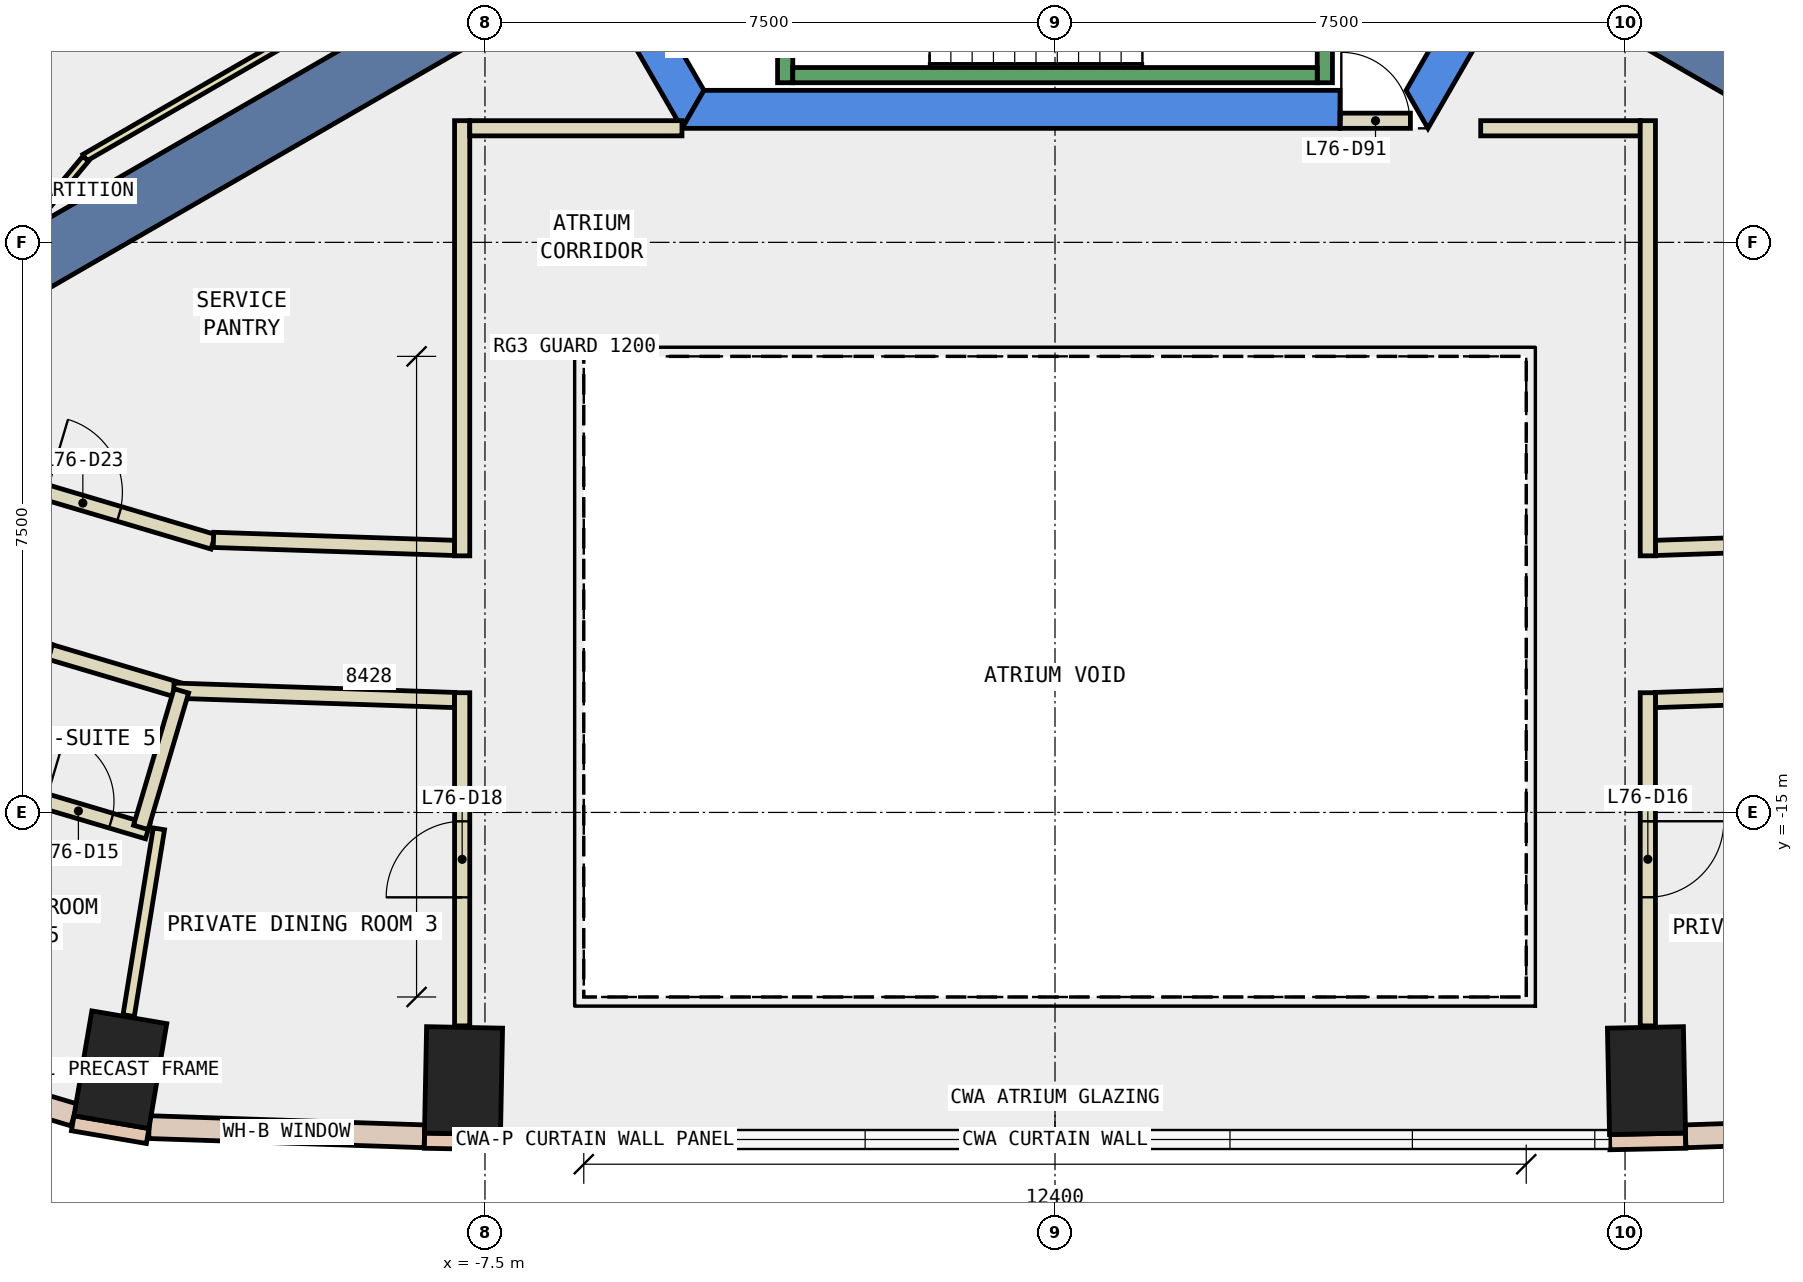
"""IFC4 building model, lengths in metres.
Left out: names, types, materials, properties, quantities, classifications, styles, units other than length and angle.
Written with IfcOpenShell. Run it as: python <this file> out.ifc"""

import sys

from ifc_helpers import new_model, si_unit, direction, frame, frame_2d, origin, origin_2d, place, context, subcontext, project, spatial, polyline, rectangle, outline, extrude, element, fill, save


model = new_model("IFC4")
c1 = context("Model", 3, precision=1e-05, world=origin(), true_north=direction((0.0, 1.0)))
c2 = subcontext(c1, "Body", "Model", "MODEL_VIEW")
j1 = project(units=[si_unit("LENGTHUNIT", "METRE"), si_unit("PLANEANGLEUNIT", "RADIAN")], contexts=[c1])
p1 = place(None, origin())
s1 = spatial("IfcSite", under=j1, at=p1, CompositionType="ELEMENT")
p2 = place(p1, origin())
s2 = spatial("IfcBuilding", under=s1, at=p2, CompositionType="ELEMENT")
p3 = place(p2, frame((0.0, 0.0, 322.4)))
s3 = spatial("IfcBuildingStorey", under=s2, at=p3, CompositionType="ELEMENT", Elevation=322.4)
for number, where, z_axis, x_axis in (
    (1, (-12.297, -18.385, -0.34), (0.0, 0.0, 1.0), (-0.986, 0.168, 0.0)),
    (2, (-7.782, -18.528, -0.34), (0.0, 0.0, 1.0), (-1.0, 0.02, 0.0)),
    (3, (7.782, -18.528, -0.34), (0.0, 0.0, 1.0), (1.0, 0.02, 0.0)),
):
    element("IfcColumn", number, at=place(p3, frame(where, z_axis=z_axis, x_axis=x_axis)), inside=s3, PredefinedType="COLUMN", context=c2, shape_type="SweptSolid", body=[
        extrude(rectangle(XDim=1.0, YDim=1.4, at=origin_2d()), origin(), (0.0, 0.0, 1.0), 3.34),
    ])
p4 = place(p3, frame((0.0, 0.0, -0.34)))
e4 = element("IfcWall", 4, at=p4, inside=s3, PredefinedType="SHEAR", context=c2, shape_type="SweptSolid", body=[
    extrude(outline(polyline([(-9.815, 2.5), (-4.907, -6.0), (-4.619, -5.5), (-9.238, 2.5), (-9.815, 2.5)])), origin(), (0.0, 0.0, 1.0), 3.34),
])
p5 = place(p3, frame((0.0, 0.0, -0.34)))
e5 = element("IfcWall", 5, at=p5, inside=s3, PredefinedType="SHEAR", context=c2, shape_type="SweptSolid", body=[
    extrude(outline(polyline([(3.75, -6.0), (3.75, -5.5), (-4.619, -5.5), (-4.907, -6.0), (3.75, -6.0)])), origin(), (0.0, 0.0, 1.0), 3.34),
])
p6 = place(p3, frame((0.0, 0.0, -0.34)))
e6 = element("IfcWall", 6, at=p6, inside=s3, PredefinedType="SHEAR", context=c2, shape_type="SweptSolid", body=[
    extrude(outline(polyline([(4.907, -6.0), (9.815, 2.5), (9.238, 2.5), (4.619, -5.5), (4.907, -6.0)])), origin(), (0.0, 0.0, 1.0), 3.34),
])
for number, where, z_axis, x_axis in (
    (7, (6.279, -3.625, -0.34), (0.0, 0.0, 1.0), (0.866, -0.5, 0.0)),
    (8, (-6.279, -3.625, -0.34), (0.0, 0.0, 1.0), (-0.866, -0.5, 0.0)),
):
    element("IfcWall", number, at=place(p3, frame(where, z_axis=z_axis, x_axis=x_axis)), inside=s3, PredefinedType="SHEAR", context=c2, shape_type="SweptSolid", body=[
        extrude(rectangle(XDim=9.0, YDim=0.8, at=frame_2d((4.5, 0.0))), origin(), (0.0, 0.0, 1.0), 3.34),
    ])
for number, where, z_axis, x_axis in (
    (9, (-12.924, -19.089, 0.0), (0.0, 0.0, 1.0), (0.986, -0.168, 0.0)),
    (10, (-8.298, -19.318, 0.0), (0.0, 0.0, 1.0), (1.0, -0.02, 0.0)),
    (11, (7.298, -19.338, 0.0), (0.0, 0.0, 1.0), (1.0, 0.02, 0.0)),
):
    element("IfcWall", number, at=place(p3, frame(where, z_axis=z_axis, x_axis=x_axis)), inside=s3, PredefinedType="STANDARD", context=c2, shape_type="SweptSolid", body=[
        extrude(rectangle(XDim=1.0, YDim=0.2, at=frame_2d((0.5, 0.0))), origin(), (0.0, 0.0, 1.0), 3.0),
    ])
p7 = place(p3, frame((-11.919, -19.14, 0.0), z_axis=(0.0, 0.0, 1.0), x_axis=(0.999441913039, -0.033404527552, 0.0)))
e12 = element("IfcWall", 12, at=p7, inside=s3, PredefinedType="STANDARD", context=c2, shape_type="SweptSolid", body=[
    extrude(rectangle(XDim=3.625, YDim=0.3, at=frame_2d((1.812, 0.0))), origin(), (0.0, 0.0, 1.0), 3.0),
])
p8 = place(p7, frame((1.113, 0.0, 0.9)))
e13 = element("IfcOpeningElement", 13, at=p8, cuts=e12, PredefinedType="OPENING", context=c2, shape_type="SweptSolid", body=[
    extrude(rectangle(XDim=1.4, YDim=2.0, at=frame_2d((0.7, 1.0))), frame((0.0, 0.16, 0.0), z_axis=(0.0, -1.0, 0.0), x_axis=(1.0, 0.0, 0.0)), (0.0, 0.0, 1.0), 0.32),
])
p9 = place(p3, frame((8.296, -19.261, 0.0), z_axis=(0.0, 0.0, 1.0), x_axis=(0.999441913039, 0.033404527552, 0.0)))
e14 = element("IfcWall", 14, at=p9, inside=s3, PredefinedType="STANDARD", context=c2, shape_type="SweptSolid", body=[
    extrude(rectangle(XDim=3.625, YDim=0.3, at=frame_2d((1.812, 0.0))), origin(), (0.0, 0.0, 1.0), 3.0),
])
p10 = place(p9, frame((1.113, 0.0, 0.9)))
e15 = element("IfcOpeningElement", 15, at=p10, cuts=e14, PredefinedType="OPENING", context=c2, shape_type="SweptSolid", body=[
    extrude(rectangle(XDim=1.4, YDim=2.0, at=frame_2d((0.7, 1.0))), frame((0.0, 0.16, 0.0), z_axis=(0.0, -1.0, 0.0), x_axis=(1.0, 0.0, 0.0)), (0.0, 0.0, 1.0), 0.32),
])
p11 = place(p3, frame((-17.842, -17.516, 0.0), z_axis=(0.0, 0.0, 1.0), x_axis=(0.958757933751, -0.284223898486, 0.0)))
e16 = element("IfcWall", 16, at=p11, inside=s3, PredefinedType="STANDARD", context=c2, shape_type="SweptSolid", body=[
    extrude(rectangle(XDim=5.15, YDim=0.3, at=frame_2d((2.575, 0.0))), origin(), (0.0, 0.0, 1.0), 3.0),
])
p12 = place(p11, frame((0.588, 0.0, 0.9)))
e17 = element("IfcOpeningElement", 17, at=p12, cuts=e16, PredefinedType="OPENING", context=c2, shape_type="SweptSolid", body=[
    extrude(rectangle(XDim=1.4, YDim=2.0, at=frame_2d((0.7, 1.0))), frame((0.0, 0.16, 0.0), z_axis=(0.0, -1.0, 0.0), x_axis=(1.0, 0.0, 0.0)), (0.0, 0.0, 1.0), 0.32),
])
p13 = place(p11, frame((3.163, 0.0, 0.9)))
e18 = element("IfcOpeningElement", 18, at=p13, cuts=e16, PredefinedType="OPENING", context=c2, shape_type="SweptSolid", body=[
    extrude(rectangle(XDim=1.4, YDim=2.0, at=frame_2d((0.7, 1.0))), frame((0.0, 0.16, 0.0), z_axis=(0.0, -1.0, 0.0), x_axis=(1.0, 0.0, 0.0)), (0.0, 0.0, 1.0), 0.32),
])
p14 = place(p3, frame((7.9, -11.52, 0.0), z_axis=(0.0, 0.0, 1.0), x_axis=(0.999442599499, 0.033383982774, 0.0)))
e19 = element("IfcWall", 19, at=p14, inside=s3, PredefinedType="PARTITIONING", context=c2, shape_type="SweptSolid", body=[
    extrude(rectangle(XDim=3.174, YDim=0.2, at=frame_2d((1.587, 0.0))), origin(), (0.0, 0.0, 1.0), 3.0),
])
p15 = place(p3, frame((-11.489, 1.942, 0.0), z_axis=(0.0, 0.0, 1.0), x_axis=(-0.475643534049, -0.879638123615, 0.0)))
e20 = element("IfcWall", 20, at=p15, inside=s3, PredefinedType="PARTITIONING", context=c2, shape_type="SweptSolid", body=[
    extrude(rectangle(XDim=7.871, YDim=0.2, at=frame_2d((3.936, 0.0))), origin(), (0.0, 0.0, 1.0), 3.0),
])
p16 = place(p15, frame((3.436, 0.0, 0.0)))
e21 = element("IfcOpeningElement", 21, at=p16, cuts=e20, PredefinedType="OPENING", context=c2, shape_type="SweptSolid", body=[
    extrude(rectangle(XDim=1.0, YDim=2.1, at=frame_2d((0.5, 1.05))), frame((0.0, 0.11, 0.0), z_axis=(0.0, -1.0, 0.0), x_axis=(1.0, 0.0, 0.0)), (0.0, 0.0, 1.0), 0.22),
])
p17 = place(p3, frame((-14.506, -10.422, 0.0), z_axis=(0.0, 0.0, 1.0), x_axis=(0.958760241353, -0.284216114252, 0.0)))
e22 = element("IfcWall", 22, at=p17, inside=s3, PredefinedType="PARTITIONING", context=c2, shape_type="SweptSolid", body=[
    extrude(rectangle(XDim=3.578, YDim=0.2, at=frame_2d((1.789, 0.0))), origin(), (0.0, 0.0, 1.0), 3.0),
])
p18 = place(p17, frame((1.289, 0.0, 0.0)))
e23 = element("IfcOpeningElement", 23, at=p18, cuts=e22, PredefinedType="OPENING", context=c2, shape_type="SweptSolid", body=[
    extrude(rectangle(XDim=1.0, YDim=2.1, at=frame_2d((0.5, 1.05))), frame((0.0, 0.11, 0.0), z_axis=(0.0, -1.0, 0.0), x_axis=(1.0, 0.0, 0.0)), (0.0, 0.0, 1.0), 0.22),
])
p19 = place(p3, frame((-11.072, -11.414, 0.0), z_axis=(0.0, 0.0, 1.0), x_axis=(0.999442599499, -0.033383982774, 0.0)))
e24 = element("IfcWall", 24, at=p19, inside=s3, PredefinedType="PARTITIONING", context=c2, shape_type="SweptSolid", body=[
    extrude(rectangle(XDim=3.174, YDim=0.2, at=frame_2d((1.587, 0.0))), origin(), (0.0, 0.0, 1.0), 3.0),
])
p20 = place(p3, frame((11.52, -13.4, 0.0), z_axis=(0.0, 0.0, 1.0), x_axis=(-0.999441010134, -0.033431530957, 0.0)))
e25 = element("IfcWall", 25, at=p20, inside=s3, PredefinedType="PARTITIONING", context=c2, shape_type="SweptSolid", body=[
    extrude(rectangle(XDim=3.622, YDim=0.2, at=frame_2d((1.811, 0.0))), origin(), (0.0, 0.0, 1.0), 3.0),
])
p21 = place(p3, frame((-13.22, -12.889, 0.0), z_axis=(0.0, 0.0, 1.0), x_axis=(-0.958789155152, 0.284118559693, 0.0)))
e26 = element("IfcWall", 26, at=p21, inside=s3, PredefinedType="PARTITIONING", context=c2, shape_type="SweptSolid", body=[
    extrude(rectangle(XDim=2.2, YDim=0.2, at=frame_2d((1.1, 0.0))), origin(), (0.0, 0.0, 1.0), 3.0),
])
p22 = place(p3, frame((-11.495, -13.401, 0.0), z_axis=(0.0, 0.0, 1.0), x_axis=(-0.958662482938, 0.284545679649, 0.0)))
e27 = element("IfcWall", 27, at=p22, inside=s3, PredefinedType="PARTITIONING", context=c2, shape_type="SweptSolid", body=[
    extrude(rectangle(XDim=1.799, YDim=0.2, at=frame_2d((0.9, 0.0))), origin(), (0.0, 0.0, 1.0), 3.0),
])
p23 = place(p3, frame((-7.9, -13.521, 0.0), z_axis=(0.0, 0.0, 1.0), x_axis=(-0.999437184802, 0.033545694739, 0.0)))
e28 = element("IfcWall", 28, at=p23, inside=s3, PredefinedType="PARTITIONING", context=c2, shape_type="SweptSolid", body=[
    extrude(rectangle(XDim=3.697, YDim=0.2, at=frame_2d((1.849, 0.0))), origin(), (0.0, 0.0, 1.0), 3.0),
])
p24 = place(p3, frame((5.601, -5.999, 0.0), z_axis=(0.0, 0.0, 1.0), x_axis=(1.0, 0.0, 0.0)))
e29 = element("IfcWall", 29, at=p24, inside=s3, PredefinedType="PARTITIONING", context=c2, shape_type="SweptSolid", body=[
    extrude(rectangle(XDim=2.099, YDim=0.2, at=frame_2d((1.049, 0.0))), origin(), (0.0, 0.0, 1.0), 3.0),
])
for number, where, z_axis, x_axis in (
    (30, (7.8, -5.899, 0.0), (0.0, 0.0, 1.0), (0.0, -1.0, 0.0)),
    (31, (-7.8, -11.624, 0.0), (0.0, 0.0, 1.0), (0.0, 1.0, 0.0)),
):
    element("IfcWall", number, at=place(p3, frame(where, z_axis=z_axis, x_axis=x_axis)), inside=s3, PredefinedType="PARTITIONING", context=c2, shape_type="SweptSolid", body=[
        extrude(rectangle(XDim=5.725, YDim=0.2, at=frame_2d((2.863, 0.0))), origin(), (0.0, 0.0, 1.0), 3.0),
    ])
p25 = place(p3, frame((-7.7, -5.999, 0.0), z_axis=(0.0, 0.0, 1.0), x_axis=(1.0, 0.0, 0.0)))
e32 = element("IfcWall", 32, at=p25, inside=s3, PredefinedType="PARTITIONING", context=c2, shape_type="SweptSolid", body=[
    extrude(rectangle(XDim=2.792, YDim=0.2, at=frame_2d((1.396, 0.0))), origin(), (0.0, 0.0, 1.0), 3.0),
])
p26 = place(p3, frame((7.8, -13.425, 0.0), z_axis=(0.0, 0.0, 1.0), x_axis=(0.0, -1.0, 0.0)))
e33 = element("IfcWall", 33, at=p26, inside=s3, PredefinedType="PARTITIONING", context=c2, shape_type="SweptSolid", body=[
    extrude(rectangle(XDim=4.383, YDim=0.2, at=frame_2d((2.191, 0.0))), origin(), (0.0, 0.0, 1.0), 3.0),
])
p27 = place(p26, frame((1.691, 0.0, 0.0)))
e34 = element("IfcOpeningElement", 34, at=p27, cuts=e33, PredefinedType="OPENING", context=c2, shape_type="SweptSolid", body=[
    extrude(rectangle(XDim=1.0, YDim=2.1, at=frame_2d((0.5, 1.05))), frame((0.0, 0.11, 0.0), z_axis=(0.0, -1.0, 0.0), x_axis=(1.0, 0.0, 0.0)), (0.0, 0.0, 1.0), 0.22),
])
p28 = place(p3, frame((-7.8, -17.808, 0.0), z_axis=(0.0, 0.0, 1.0), x_axis=(0.0, 1.0, 0.0)))
e35 = element("IfcWall", 35, at=p28, inside=s3, PredefinedType="PARTITIONING", context=c2, shape_type="SweptSolid", body=[
    extrude(rectangle(XDim=4.383, YDim=0.2, at=frame_2d((2.191, 0.0))), origin(), (0.0, 0.0, 1.0), 3.0),
])
p29 = place(p28, frame((1.691, 0.0, 0.0)))
e36 = element("IfcOpeningElement", 36, at=p29, cuts=e35, PredefinedType="OPENING", context=c2, shape_type="SweptSolid", body=[
    extrude(rectangle(XDim=1.0, YDim=2.1, at=frame_2d((0.5, 1.05))), frame((0.0, 0.11, 0.0), z_axis=(0.0, -1.0, 0.0), x_axis=(1.0, 0.0, 0.0)), (0.0, 0.0, 1.0), 0.22),
])
p30 = place(p3, frame((-6.705, -2.887, 0.0), z_axis=(0.0, 0.0, 1.0), x_axis=(-0.866001397039, -0.500041578597, 0.0)))
e37 = element("IfcWall", 37, at=p30, inside=s3, PredefinedType="PARTITIONING", context=c2, shape_type="SweptSolid", body=[
    extrude(rectangle(XDim=6.998, YDim=0.1, at=frame_2d((3.499, 0.0))), origin(), (0.0, 0.0, 1.0), 3.0),
])
p31 = place(p3, frame((-12.753, -6.399, 0.0), z_axis=(0.0, 0.0, 1.0), x_axis=(-0.640077503072, -0.768310347491, 0.0)))
e38 = element("IfcWall", 38, at=p31, inside=s3, PredefinedType="PARTITIONING", context=c2, shape_type="SweptSolid", body=[
    extrude(rectangle(XDim=1.123, YDim=0.1, at=frame_2d((0.562, 0.0))), origin(), (0.0, 0.0, 1.0), 3.0),
])
p32 = place(p3, frame((-13.76, -14.711, 0.0), z_axis=(0.0, 0.0, 1.0), x_axis=(0.958772187895, -0.284175811285, 0.0)))
e39 = element("IfcWall", 39, at=p32, inside=s3, PredefinedType="PARTITIONING", context=c2, shape_type="SweptSolid", body=[
    extrude(rectangle(XDim=1.9, YDim=0.2, at=frame_2d((0.95, 0.0))), origin(), (0.0, 0.0, 1.0), 3.0),
])
p33 = place(p32, frame((0.5, 0.0, 0.0)))
e40 = element("IfcOpeningElement", 40, at=p33, cuts=e39, PredefinedType="OPENING", context=c2, shape_type="SweptSolid", body=[
    extrude(rectangle(XDim=0.9, YDim=2.1, at=frame_2d((0.45, 1.05))), frame((0.0, 0.11, 0.0), z_axis=(0.0, -1.0, 0.0), x_axis=(1.0, 0.0, 0.0)), (0.0, 0.0, 1.0), 0.22),
])
p34 = place(p3, frame((-11.79, -15.216, 0.0), z_axis=(0.0, 0.0, 1.0), x_axis=(-0.159880010227, -0.98713645578, 0.0)))
e41 = element("IfcWall", 41, at=p34, inside=s3, PredefinedType="PARTITIONING", context=c2, shape_type="SweptSolid", body=[
    extrude(rectangle(XDim=2.489, YDim=0.15, at=frame_2d((1.245, 0.0))), origin(), (0.0, 0.0, 1.0), 3.0),
])
p35 = place(p3, frame((-11.495, -13.401, 0.0), z_axis=(0.0, 0.0, 1.0), x_axis=(-0.284465432667, -0.958686297815, 0.0)))
e42 = element("IfcWall", 42, at=p35, inside=s3, PredefinedType="PARTITIONING", context=c2, shape_type="SweptSolid", body=[
    extrude(rectangle(XDim=1.874, YDim=0.2, at=frame_2d((0.937, 0.0))), origin(), (0.0, 0.0, 1.0), 3.0),
])
p36 = place(p3, frame((3.75, -5.9, 0.0), z_axis=(0.0, 0.0, 1.0), x_axis=(1.0, 0.0, 0.0)))
e43 = element("IfcWall", 43, at=p36, inside=s3, PredefinedType="PARTITIONING", context=c2, shape_type="SweptSolid", body=[
    extrude(rectangle(XDim=0.926, YDim=0.2, at=frame_2d((0.463, 0.0))), origin(), (0.0, 0.0, 1.0), 2.4),
])
p37 = place(p36, frame((0.017, 0.0, 0.0)))
e44 = element("IfcOpeningElement", 44, at=p37, cuts=e43, PredefinedType="OPENING", context=c2, shape_type="SweptSolid", body=[
    extrude(rectangle(XDim=0.9, YDim=2.1, at=frame_2d((0.45, 1.05))), frame((0.0, 0.11, 0.0), z_axis=(0.0, -1.0, 0.0), x_axis=(1.0, 0.0, 0.0)), (0.0, 0.0, 1.0), 0.22),
])
p38 = place(p3, frame((-3.55, -1.0, 0.0), z_axis=(0.0, 0.0, 1.0), x_axis=(0.0, -1.0, 0.0)))
e45 = element("IfcWall", 45, at=p38, inside=s3, PredefinedType="STANDARD", context=c2, shape_type="SweptSolid", body=[
    extrude(rectangle(XDim=4.4, YDim=0.2, at=frame_2d((2.2, 0.0))), origin(), (0.0, 0.0, 1.0), 3.0),
])
p39 = place(p38, frame((2.4, 0.0, 0.0)))
e46 = element("IfcOpeningElement", 46, at=p39, cuts=e45, PredefinedType="OPENING", context=c2, shape_type="SweptSolid", body=[
    extrude(rectangle(XDim=1.1, YDim=2.2, at=frame_2d((0.55, 1.1))), frame((0.0, 0.11, 0.0), z_axis=(0.0, -1.0, 0.0), x_axis=(1.0, 0.0, 0.0)), (0.0, 0.0, 1.0), 0.22),
])
p40 = place(p3, frame((3.55, -2.667, 0.0), z_axis=(0.0, 0.0, 1.0), x_axis=(0.0, -1.0, 0.0)))
e47 = element("IfcWall", 47, at=p40, inside=s3, PredefinedType="STANDARD", context=c2, shape_type="SweptSolid", body=[
    extrude(rectangle(XDim=2.733, YDim=0.2, at=frame_2d((1.366, 0.0))), origin(), (0.0, 0.0, 1.0), 3.0),
])
p41 = place(p3, frame((-3.45, -5.3, 0.0), z_axis=(0.0, 0.0, 1.0), x_axis=(1.0, 0.0, 0.0)))
e48 = element("IfcWall", 48, at=p41, inside=s3, PredefinedType="STANDARD", context=c2, shape_type="SweptSolid", body=[
    extrude(rectangle(XDim=6.9, YDim=0.2, at=frame_2d((3.45, 0.0))), origin(), (0.0, 0.0, 1.0), 3.0),
])
p42 = place(p8, origin())
e49 = element("IfcWindow", 49, at=p42, inside=s3, PartitioningType="SINGLE_PANEL", PredefinedType="WINDOW", context=c2, shape_type="SweptSolid", body=[
    extrude(rectangle(XDim=1.4, YDim=2.0, at=frame_2d((0.7, 1.0))), frame((0.0, 0.03, 0.0), z_axis=(0.0, -1.0, 0.0), x_axis=(1.0, 0.0, 0.0)), (0.0, 0.0, 1.0), 0.06),
])
fill(e13, e49)
p43 = place(p33, origin())
e50 = element("IfcDoor", 50, at=p43, inside=s3, OperationType="SINGLE_SWING_LEFT", PredefinedType="DOOR", context=c2, shape_type="SweptSolid", body=[
    extrude(rectangle(XDim=0.9, YDim=2.1, at=frame_2d((0.45, 1.05))), frame((0.0, 0.025, 0.0), z_axis=(0.0, -1.0, 0.0), x_axis=(1.0, 0.0, 0.0)), (0.0, 0.0, 1.0), 0.05),
])
fill(e40, e50)
p44 = place(p27, origin())
e51 = element("IfcDoor", 51, at=p44, inside=s3, OperationType="SINGLE_SWING_LEFT", PredefinedType="DOOR", context=c2, shape_type="SweptSolid", body=[
    extrude(rectangle(XDim=1.0, YDim=2.1, at=frame_2d((0.5, 1.05))), frame((0.0, 0.025, 0.0), z_axis=(0.0, -1.0, 0.0), x_axis=(1.0, 0.0, 0.0)), (0.0, 0.0, 1.0), 0.05),
])
fill(e34, e51)
p45 = place(p29, origin())
e52 = element("IfcDoor", 52, at=p45, inside=s3, OperationType="SINGLE_SWING_LEFT", PredefinedType="DOOR", context=c2, shape_type="SweptSolid", body=[
    extrude(rectangle(XDim=1.0, YDim=2.1, at=frame_2d((0.5, 1.05))), frame((0.0, 0.025, 0.0), z_axis=(0.0, -1.0, 0.0), x_axis=(1.0, 0.0, 0.0)), (0.0, 0.0, 1.0), 0.05),
])
fill(e36, e52)
p46 = place(p18, origin())
e53 = element("IfcDoor", 53, at=p46, inside=s3, OperationType="SINGLE_SWING_RIGHT", PredefinedType="DOOR", context=c2, shape_type="SweptSolid", body=[
    extrude(rectangle(XDim=1.0, YDim=2.1, at=frame_2d((0.5, 1.05))), frame((0.0, 0.025, 0.0), z_axis=(0.0, -1.0, 0.0), x_axis=(1.0, 0.0, 0.0)), (0.0, 0.0, 1.0), 0.05),
])
fill(e23, e53)
p47 = place(p37, origin())
e54 = element("IfcDoor", 54, at=p47, inside=s3, OperationType="SINGLE_SWING_LEFT", PredefinedType="DOOR", context=c2, shape_type="SweptSolid", body=[
    extrude(rectangle(XDim=0.9, YDim=2.1, at=frame_2d((0.45, 1.05))), frame((0.0, 0.025, 0.0), z_axis=(0.0, -1.0, 0.0), x_axis=(1.0, 0.0, 0.0)), (0.0, 0.0, 1.0), 0.05),
])
fill(e44, e54)
save(model, sys.argv[1])
